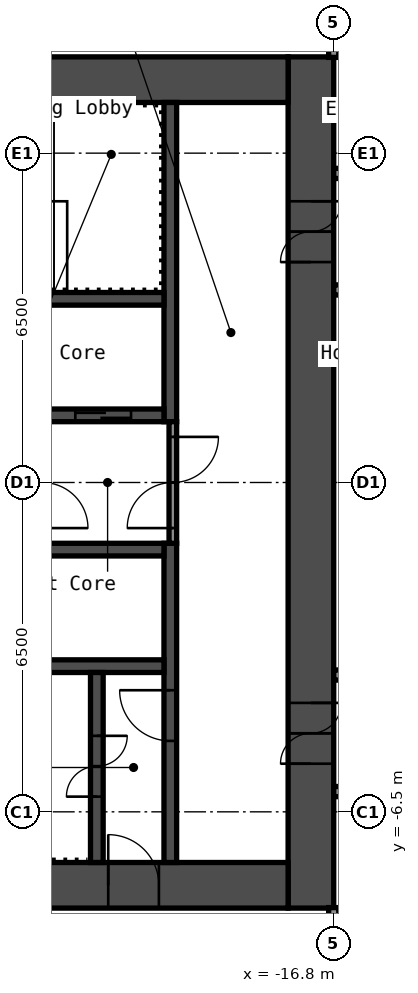
"""IFC4 building model, lengths in metres.
Left out: names, types, materials, properties, quantities, classifications, styles, units other than length and angle.
Written with IfcOpenShell. Run it as: python <this file> out.ifc"""

import sys

from ifc_helpers import new_model, si_unit, direction, frame, frame_2d, origin, place, context, subcontext, project, spatial, rectangle, extrude, element, fill, save


model = new_model("IFC4")
c1 = context("Model", 3, precision=1e-05, world=origin(), true_north=direction((0.0, 1.0)))
c2 = subcontext(c1, "Body", "Model", "MODEL_VIEW")
j1 = project(units=[si_unit("LENGTHUNIT", "METRE"), si_unit("PLANEANGLEUNIT", "RADIAN")], contexts=[c1])
p1 = place(None, origin())
s1 = spatial("IfcSite", under=j1, at=p1, CompositionType="ELEMENT")
p2 = place(p1, origin())
s2 = spatial("IfcBuilding", under=s1, at=p2, CompositionType="ELEMENT")
p3 = place(p2, frame((0.0, 0.0, 51.8)))
s3 = spatial("IfcBuildingStorey", under=s2, at=p3, CompositionType="ELEMENT", Elevation=51.8)
p4 = place(p3, frame((-17.25, -8.4, 0.0), z_axis=(0.0, 0.0, 1.0), x_axis=(0.0, 1.0, 0.0)))
e1 = element("IfcWall", 1, at=p4, inside=s3, PredefinedType="SHEAR", context=c2, shape_type="SweptSolid", body=[
    extrude(rectangle(XDim=16.8, YDim=0.9, at=frame_2d((8.4, 0.0))), origin(), (0.0, 0.0, 1.0), 2.8),
])
p5 = place(p4, frame((12.75, 0.0, 0.0)))
e2 = element("IfcOpeningElement", 2, at=p5, cuts=e1, PredefinedType="OPENING", context=c2, shape_type="SweptSolid", body=[
    extrude(rectangle(XDim=1.2, YDim=2.1, at=frame_2d((0.6, 1.05))), frame((0.0, 0.46, 0.0), z_axis=(0.0, -1.0, 0.0), x_axis=(1.0, 0.0, 0.0)), (0.0, 0.0, 1.0), 0.92),
])
p6 = place(p4, frame((2.85, 0.0, 0.0)))
e3 = element("IfcOpeningElement", 3, at=p6, cuts=e1, PredefinedType="OPENING", context=c2, shape_type="SweptSolid", body=[
    extrude(rectangle(XDim=1.2, YDim=2.1, at=frame_2d((0.6, 1.05))), frame((0.0, 0.46, 0.0), z_axis=(0.0, -1.0, 0.0), x_axis=(1.0, 0.0, 0.0)), (0.0, 0.0, 1.0), 0.92),
])
p7 = place(p3, frame((-32.7, 7.95, 0.0), z_axis=(0.0, 0.0, 1.0), x_axis=(1.0, 0.0, 0.0)))
e4 = element("IfcWall", 4, at=p7, inside=s3, PredefinedType="SHEAR", context=c2, shape_type="SweptSolid", body=[
    extrude(rectangle(XDim=15.0, YDim=0.9, at=frame_2d((7.5, 0.0))), origin(), (0.0, 0.0, 1.0), 2.8),
])
p8 = place(p7, frame((3.4, 0.0, 0.0)))
e5 = element("IfcOpeningElement", 5, at=p8, cuts=e4, PredefinedType="OPENING", context=c2, shape_type="SweptSolid", body=[
    extrude(rectangle(XDim=1.2, YDim=2.1, at=frame_2d((0.6, 1.05))), frame((0.0, 0.46, 0.0), z_axis=(0.0, -1.0, 0.0), x_axis=(1.0, 0.0, 0.0)), (0.0, 0.0, 1.0), 0.92),
])
p9 = place(p7, frame((0.75, 0.0, 0.0)))
e6 = element("IfcOpeningElement", 6, at=p9, cuts=e4, PredefinedType="OPENING", context=c2, shape_type="SweptSolid", body=[
    extrude(rectangle(XDim=0.9, YDim=2.1, at=frame_2d((0.45, 1.05))), frame((0.0, 0.46, 0.0), z_axis=(0.0, -1.0, 0.0), x_axis=(1.0, 0.0, 0.0)), (0.0, 0.0, 1.0), 0.92),
])
p10 = place(p3, frame((-32.7, -7.95, 0.0), z_axis=(0.0, 0.0, 1.0), x_axis=(1.0, 0.0, 0.0)))
e7 = element("IfcWall", 7, at=p10, inside=s3, PredefinedType="SHEAR", context=c2, shape_type="SweptSolid", body=[
    extrude(rectangle(XDim=15.0, YDim=0.9, at=frame_2d((7.5, 0.0))), origin(), (0.0, 0.0, 1.0), 2.8),
])
p11 = place(p10, frame((11.45, 0.0, 0.0)))
e8 = element("IfcOpeningElement", 8, at=p11, cuts=e7, PredefinedType="OPENING", context=c2, shape_type="SweptSolid", body=[
    extrude(rectangle(XDim=1.0, YDim=2.1, at=frame_2d((0.5, 1.05))), frame((0.0, 0.46, 0.0), z_axis=(0.0, -1.0, 0.0), x_axis=(1.0, 0.0, 0.0)), (0.0, 0.0, 1.0), 0.92),
])
p12 = place(p3, frame((-20.025, 1.2, 0.0), z_axis=(0.0, 0.0, 1.0), x_axis=(0.0, 1.0, 0.0)))
e9 = element("IfcWall", 9, at=p12, inside=s3, PredefinedType="SHEAR", context=c2, shape_type="SweptSolid", body=[
    extrude(rectangle(XDim=6.3, YDim=0.25, at=frame_2d((3.15, 0.0))), origin(), (0.0, 0.0, 1.0), 2.8),
])
p13 = place(p3, frame((-20.025, -7.5, 0.0), z_axis=(0.0, 0.0, 1.0), x_axis=(0.0, 1.0, 0.0)))
e10 = element("IfcWall", 10, at=p13, inside=s3, PredefinedType="SHEAR", context=c2, shape_type="SweptSolid", body=[
    extrude(rectangle(XDim=6.3, YDim=0.25, at=frame_2d((3.15, 0.0))), origin(), (0.0, 0.0, 1.0), 2.8),
])
p14 = place(p13, frame((2.4, 0.0, 0.0)))
e11 = element("IfcOpeningElement", 11, at=p14, cuts=e10, PredefinedType="OPENING", context=c2, shape_type="SweptSolid", body=[
    extrude(rectangle(XDim=1.0, YDim=2.1, at=frame_2d((0.5, 1.05))), frame((0.0, 0.135, 0.0), z_axis=(0.0, -1.0, 0.0), x_axis=(1.0, 0.0, 0.0)), (0.0, 0.0, 1.0), 0.27),
])
p15 = place(p3, frame((-27.65, 1.325, 0.0), z_axis=(0.0, 0.0, 1.0), x_axis=(1.0, 0.0, 0.0)))
e12 = element("IfcWall", 12, at=p15, inside=s3, PredefinedType="SHEAR", context=c2, shape_type="SweptSolid", body=[
    extrude(rectangle(XDim=7.5, YDim=0.25, at=frame_2d((3.75, 0.0))), origin(), (0.0, 0.0, 1.0), 2.8),
])
p16 = place(p15, frame((5.75, 0.0, 0.0)))
e13 = element("IfcOpeningElement", 13, at=p16, cuts=e12, PredefinedType="OPENING", context=c2, shape_type="SweptSolid", body=[
    extrude(rectangle(XDim=1.1, YDim=2.1, at=frame_2d((0.55, 1.05))), frame((0.0, 0.135, 0.0), z_axis=(0.0, -1.0, 0.0), x_axis=(1.0, 0.0, 0.0)), (0.0, 0.0, 1.0), 0.27),
])
p17 = place(p15, frame((3.35, 0.0, 0.0)))
e14 = element("IfcOpeningElement", 14, at=p17, cuts=e12, PredefinedType="OPENING", context=c2, shape_type="SweptSolid", body=[
    extrude(rectangle(XDim=1.1, YDim=2.1, at=frame_2d((0.55, 1.05))), frame((0.0, 0.135, 0.0), z_axis=(0.0, -1.0, 0.0), x_axis=(1.0, 0.0, 0.0)), (0.0, 0.0, 1.0), 0.27),
])
p18 = place(p15, frame((0.95, 0.0, 0.0)))
e15 = element("IfcOpeningElement", 15, at=p18, cuts=e12, PredefinedType="OPENING", context=c2, shape_type="SweptSolid", body=[
    extrude(rectangle(XDim=1.1, YDim=2.1, at=frame_2d((0.55, 1.05))), frame((0.0, 0.135, 0.0), z_axis=(0.0, -1.0, 0.0), x_axis=(1.0, 0.0, 0.0)), (0.0, 0.0, 1.0), 0.27),
])
for number, where, z_axis, x_axis in (
    (16, (-27.65, 3.625, 0.0), (0.0, 0.0, 1.0), (1.0, 0.0, 0.0)),
    (17, (-27.65, -1.325, 0.0), (0.0, 0.0, 1.0), (1.0, 0.0, 0.0)),
    (18, (-27.65, -3.625, 0.0), (0.0, 0.0, 1.0), (1.0, 0.0, 0.0)),
):
    element("IfcWall", number, at=place(p3, frame(where, z_axis=z_axis, x_axis=x_axis)), inside=s3, PredefinedType="SHEAR", context=c2, shape_type="SweptSolid", body=[
        extrude(rectangle(XDim=7.5, YDim=0.25, at=frame_2d((3.75, 0.0))), origin(), (0.0, 0.0, 1.0), 2.8),
    ])
p19 = place(p3, frame((-21.475, -7.5, 0.0), z_axis=(0.0, 0.0, 1.0), x_axis=(0.0, 1.0, 0.0)))
e19 = element("IfcWall", 19, at=p19, inside=s3, PredefinedType="SHEAR", context=c2, shape_type="SweptSolid", body=[
    extrude(rectangle(XDim=3.75, YDim=0.25, at=frame_2d((1.875, 0.0))), origin(), (0.0, 0.0, 1.0), 2.8),
])
p20 = place(p19, frame((1.3, 0.0, 0.0)))
e20 = element("IfcOpeningElement", 20, at=p20, cuts=e19, PredefinedType="OPENING", context=c2, shape_type="SweptSolid", body=[
    extrude(rectangle(XDim=1.2, YDim=2.1, at=frame_2d((0.6, 1.05))), frame((0.0, 0.135, 0.0), z_axis=(0.0, -1.0, 0.0), x_axis=(1.0, 0.0, 0.0)), (0.0, 0.0, 1.0), 0.27),
])
p21 = place(p3, frame((-19.975, -1.2, 0.0), z_axis=(0.0, 0.0, 1.0), x_axis=(0.0, 1.0, 0.0)))
e21 = element("IfcWall", 21, at=p21, inside=s3, PredefinedType="PARTITIONING", context=c2, shape_type="SweptSolid", body=[
    extrude(rectangle(XDim=2.4, YDim=0.15, at=frame_2d((1.2, 0.0))), origin(), (0.0, 0.0, 1.0), 2.8),
])
p22 = place(p21, frame((0.3, 0.0, 0.0)))
e22 = element("IfcOpeningElement", 22, at=p22, cuts=e21, PredefinedType="OPENING", context=c2, shape_type="SweptSolid", body=[
    extrude(rectangle(XDim=1.8, YDim=2.1, at=frame_2d((0.9, 1.05))), frame((0.0, 0.085, 0.0), z_axis=(0.0, -1.0, 0.0), x_axis=(1.0, 0.0, 0.0)), (0.0, 0.0, 1.0), 0.17),
])
p23 = place(p3, frame((-16.8, -6.1, 0.0), z_axis=(0.0, 0.0, 1.0), x_axis=(1.0, 0.0, 0.0)))
e23 = element("IfcWall", 23, at=p23, inside=s3, PredefinedType="PARTITIONING", context=c2, shape_type="SweptSolid", body=[
    extrude(rectangle(XDim=33.6, YDim=0.2, at=frame_2d((16.8, 0.0))), origin(), (0.0, 0.0, 1.0), 2.8),
])
p24 = place(p23, frame((2.0, 0.0, 0.0)))
e24 = element("IfcOpeningElement", 24, at=p24, cuts=e23, PredefinedType="OPENING", context=c2, shape_type="SweptSolid", body=[
    extrude(rectangle(XDim=1.0, YDim=2.1, at=frame_2d((0.5, 1.05))), frame((0.0, 0.11, 0.0), z_axis=(0.0, -1.0, 0.0), x_axis=(1.0, 0.0, 0.0)), (0.0, 0.0, 1.0), 0.22),
])
p25 = place(p23, frame((9.46, 0.0, 0.0)))
e25 = element("IfcOpeningElement", 25, at=p25, cuts=e23, PredefinedType="OPENING", context=c2, shape_type="SweptSolid", body=[
    extrude(rectangle(XDim=0.9, YDim=2.1, at=frame_2d((0.45, 1.05))), frame((0.0, 0.11, 0.0), z_axis=(0.0, -1.0, 0.0), x_axis=(1.0, 0.0, 0.0)), (0.0, 0.0, 1.0), 0.22),
])
p26 = place(p23, frame((13.66, 0.0, 0.0)))
e26 = element("IfcOpeningElement", 26, at=p26, cuts=e23, PredefinedType="OPENING", context=c2, shape_type="SweptSolid", body=[
    extrude(rectangle(XDim=0.9, YDim=2.1, at=frame_2d((0.45, 1.05))), frame((0.0, 0.11, 0.0), z_axis=(0.0, -1.0, 0.0), x_axis=(1.0, 0.0, 0.0)), (0.0, 0.0, 1.0), 0.22),
])
p27 = place(p23, frame((18.8, 0.0, 0.0)))
e27 = element("IfcOpeningElement", 27, at=p27, cuts=e23, PredefinedType="OPENING", context=c2, shape_type="SweptSolid", body=[
    extrude(rectangle(XDim=1.0, YDim=2.1, at=frame_2d((0.5, 1.05))), frame((0.0, 0.11, 0.0), z_axis=(0.0, -1.0, 0.0), x_axis=(1.0, 0.0, 0.0)), (0.0, 0.0, 1.0), 0.22),
])
p28 = place(p23, frame((27.2, 0.0, 0.0)))
e28 = element("IfcOpeningElement", 28, at=p28, cuts=e23, PredefinedType="OPENING", context=c2, shape_type="SweptSolid", body=[
    extrude(rectangle(XDim=1.0, YDim=2.1, at=frame_2d((0.5, 1.05))), frame((0.0, 0.11, 0.0), z_axis=(0.0, -1.0, 0.0), x_axis=(1.0, 0.0, 0.0)), (0.0, 0.0, 1.0), 0.22),
])
p29 = place(p3, frame((-16.8, -3.8, 0.0), z_axis=(0.0, 0.0, 1.0), x_axis=(1.0, 0.0, 0.0)))
e29 = element("IfcWall", 29, at=p29, inside=s3, PredefinedType="PARTITIONING", context=c2, shape_type="SweptSolid", body=[
    extrude(rectangle(XDim=33.6, YDim=0.2, at=frame_2d((16.8, 0.0))), origin(), (0.0, 0.0, 1.0), 2.8),
])
p30 = place(p29, frame((9.88, 0.0, 0.0)))
e30 = element("IfcOpeningElement", 30, at=p30, cuts=e29, PredefinedType="OPENING", context=c2, shape_type="SweptSolid", body=[
    extrude(rectangle(XDim=0.9, YDim=2.1, at=frame_2d((0.45, 1.05))), frame((0.0, 0.11, 0.0), z_axis=(0.0, -1.0, 0.0), x_axis=(1.0, 0.0, 0.0)), (0.0, 0.0, 1.0), 0.22),
])
p31 = place(p29, frame((14.08, 0.0, 0.0)))
e31 = element("IfcOpeningElement", 31, at=p31, cuts=e29, PredefinedType="OPENING", context=c2, shape_type="SweptSolid", body=[
    extrude(rectangle(XDim=0.9, YDim=2.1, at=frame_2d((0.45, 1.05))), frame((0.0, 0.11, 0.0), z_axis=(0.0, -1.0, 0.0), x_axis=(1.0, 0.0, 0.0)), (0.0, 0.0, 1.0), 0.22),
])
p32 = place(p29, frame((27.355, 0.0, 0.0)))
e32 = element("IfcOpeningElement", 32, at=p32, cuts=e29, PredefinedType="OPENING", context=c2, shape_type="SweptSolid", body=[
    extrude(rectangle(XDim=0.9, YDim=2.1, at=frame_2d((0.45, 1.05))), frame((0.0, 0.11, 0.0), z_axis=(0.0, -1.0, 0.0), x_axis=(1.0, 0.0, 0.0)), (0.0, 0.0, 1.0), 0.22),
])
p33 = place(p29, frame((31.555, 0.0, 0.0)))
e33 = element("IfcOpeningElement", 33, at=p33, cuts=e29, PredefinedType="OPENING", context=c2, shape_type="SweptSolid", body=[
    extrude(rectangle(XDim=0.9, YDim=2.1, at=frame_2d((0.45, 1.05))), frame((0.0, 0.11, 0.0), z_axis=(0.0, -1.0, 0.0), x_axis=(1.0, 0.0, 0.0)), (0.0, 0.0, 1.0), 0.22),
])
p34 = place(p3, frame((-16.8, 3.8, 0.0), z_axis=(0.0, 0.0, 1.0), x_axis=(1.0, 0.0, 0.0)))
e34 = element("IfcWall", 34, at=p34, inside=s3, PredefinedType="PARTITIONING", context=c2, shape_type="SweptSolid", body=[
    extrude(rectangle(XDim=33.6, YDim=0.2, at=frame_2d((16.8, 0.0))), origin(), (0.0, 0.0, 1.0), 2.8),
])
p35 = place(p34, frame((2.24, 0.0, 0.0)))
e35 = element("IfcOpeningElement", 35, at=p35, cuts=e34, PredefinedType="OPENING", context=c2, shape_type="SweptSolid", body=[
    extrude(rectangle(XDim=0.9, YDim=2.1, at=frame_2d((0.45, 1.05))), frame((0.0, 0.11, 0.0), z_axis=(0.0, -1.0, 0.0), x_axis=(1.0, 0.0, 0.0)), (0.0, 0.0, 1.0), 0.22),
])
p36 = place(p34, frame((6.44, 0.0, 0.0)))
e36 = element("IfcOpeningElement", 36, at=p36, cuts=e34, PredefinedType="OPENING", context=c2, shape_type="SweptSolid", body=[
    extrude(rectangle(XDim=0.9, YDim=2.1, at=frame_2d((0.45, 1.05))), frame((0.0, 0.11, 0.0), z_axis=(0.0, -1.0, 0.0), x_axis=(1.0, 0.0, 0.0)), (0.0, 0.0, 1.0), 0.22),
])
p37 = place(p34, frame((18.03, 0.0, 0.0)))
e37 = element("IfcOpeningElement", 37, at=p37, cuts=e34, PredefinedType="OPENING", context=c2, shape_type="SweptSolid", body=[
    extrude(rectangle(XDim=0.9, YDim=2.1, at=frame_2d((0.45, 1.05))), frame((0.0, 0.11, 0.0), z_axis=(0.0, -1.0, 0.0), x_axis=(1.0, 0.0, 0.0)), (0.0, 0.0, 1.0), 0.22),
])
p38 = place(p34, frame((22.23, 0.0, 0.0)))
e38 = element("IfcOpeningElement", 38, at=p38, cuts=e34, PredefinedType="OPENING", context=c2, shape_type="SweptSolid", body=[
    extrude(rectangle(XDim=0.9, YDim=2.1, at=frame_2d((0.45, 1.05))), frame((0.0, 0.11, 0.0), z_axis=(0.0, -1.0, 0.0), x_axis=(1.0, 0.0, 0.0)), (0.0, 0.0, 1.0), 0.22),
])
p39 = place(p3, frame((-16.8, 6.1, 0.0), z_axis=(0.0, 0.0, 1.0), x_axis=(1.0, 0.0, 0.0)))
e39 = element("IfcWall", 39, at=p39, inside=s3, PredefinedType="PARTITIONING", context=c2, shape_type="SweptSolid", body=[
    extrude(rectangle(XDim=33.6, YDim=0.2, at=frame_2d((16.8, 0.0))), origin(), (0.0, 0.0, 1.0), 2.8),
])
p40 = place(p39, frame((5.4, 0.0, 0.0)))
e40 = element("IfcOpeningElement", 40, at=p40, cuts=e39, PredefinedType="OPENING", context=c2, shape_type="SweptSolid", body=[
    extrude(rectangle(XDim=1.0, YDim=2.1, at=frame_2d((0.5, 1.05))), frame((0.0, 0.11, 0.0), z_axis=(0.0, -1.0, 0.0), x_axis=(1.0, 0.0, 0.0)), (0.0, 0.0, 1.0), 0.22),
])
p41 = place(p39, frame((10.3, 0.0, 0.0)))
e41 = element("IfcOpeningElement", 41, at=p41, cuts=e39, PredefinedType="OPENING", context=c2, shape_type="SweptSolid", body=[
    extrude(rectangle(XDim=0.9, YDim=2.1, at=frame_2d((0.45, 1.05))), frame((0.0, 0.11, 0.0), z_axis=(0.0, -1.0, 0.0), x_axis=(1.0, 0.0, 0.0)), (0.0, 0.0, 1.0), 0.22),
])
p42 = place(p39, frame((14.5, 0.0, 0.0)))
e42 = element("IfcOpeningElement", 42, at=p42, cuts=e39, PredefinedType="OPENING", context=c2, shape_type="SweptSolid", body=[
    extrude(rectangle(XDim=0.9, YDim=2.1, at=frame_2d((0.45, 1.05))), frame((0.0, 0.11, 0.0), z_axis=(0.0, -1.0, 0.0), x_axis=(1.0, 0.0, 0.0)), (0.0, 0.0, 1.0), 0.22),
])
p43 = place(p39, frame((18.62, 0.0, 0.0)))
e43 = element("IfcOpeningElement", 43, at=p43, cuts=e39, PredefinedType="OPENING", context=c2, shape_type="SweptSolid", body=[
    extrude(rectangle(XDim=0.9, YDim=2.1, at=frame_2d((0.45, 1.05))), frame((0.0, 0.11, 0.0), z_axis=(0.0, -1.0, 0.0), x_axis=(1.0, 0.0, 0.0)), (0.0, 0.0, 1.0), 0.22),
])
p44 = place(p39, frame((22.82, 0.0, 0.0)))
e44 = element("IfcOpeningElement", 44, at=p44, cuts=e39, PredefinedType="OPENING", context=c2, shape_type="SweptSolid", body=[
    extrude(rectangle(XDim=0.9, YDim=2.1, at=frame_2d((0.45, 1.05))), frame((0.0, 0.11, 0.0), z_axis=(0.0, -1.0, 0.0), x_axis=(1.0, 0.0, 0.0)), (0.0, 0.0, 1.0), 0.22),
])
p45 = place(p39, frame((27.2, 0.0, 0.0)))
e45 = element("IfcOpeningElement", 45, at=p45, cuts=e39, PredefinedType="OPENING", context=c2, shape_type="SweptSolid", body=[
    extrude(rectangle(XDim=1.0, YDim=2.1, at=frame_2d((0.5, 1.05))), frame((0.0, 0.11, 0.0), z_axis=(0.0, -1.0, 0.0), x_axis=(1.0, 0.0, 0.0)), (0.0, 0.0, 1.0), 0.22),
])
for number, where, z_axis, x_axis in (
    (46, (-16.8, -20.3, 0.0), (0.0, 0.0, 1.0), (0.0, 1.0, 0.0)),
    (47, (-16.8, 8.39, 0.0), (0.0, 0.0, 1.0), (0.0, 1.0, 0.0)),
):
    element("IfcWall", number, at=place(p3, frame(where, z_axis=z_axis, x_axis=x_axis)), inside=s3, PredefinedType="PARTITIONING", context=c2, shape_type="SweptSolid", body=[
        extrude(rectangle(XDim=11.91, YDim=0.2, at=frame_2d((5.955, 0.0))), origin(), (0.0, 0.0, 1.0), 2.8),
    ])
p46 = place(p5, origin())
e48 = element("IfcDoor", 48, at=p46, inside=s3, OperationType="DOUBLE_DOOR_SINGLE_SWING", PredefinedType="DOOR", context=c2, shape_type="SweptSolid", body=[
    extrude(rectangle(XDim=1.2, YDim=2.1, at=frame_2d((0.6, 1.05))), frame((0.0, 0.025, 0.0), z_axis=(0.0, -1.0, 0.0), x_axis=(1.0, 0.0, 0.0)), (0.0, 0.0, 1.0), 0.05),
])
fill(e2, e48)
p47 = place(p6, origin())
e49 = element("IfcDoor", 49, at=p47, inside=s3, OperationType="DOUBLE_DOOR_SINGLE_SWING", PredefinedType="DOOR", context=c2, shape_type="SweptSolid", body=[
    extrude(rectangle(XDim=1.2, YDim=2.1, at=frame_2d((0.6, 1.05))), frame((0.0, 0.025, 0.0), z_axis=(0.0, -1.0, 0.0), x_axis=(1.0, 0.0, 0.0)), (0.0, 0.0, 1.0), 0.05),
])
fill(e3, e49)
p48 = place(p11, origin())
e50 = element("IfcDoor", 50, at=p48, inside=s3, OperationType="SINGLE_SWING_RIGHT", PredefinedType="DOOR", context=c2, shape_type="SweptSolid", body=[
    extrude(rectangle(XDim=1.0, YDim=2.1, at=frame_2d((0.5, 1.05))), frame((0.0, 0.025, 0.0), z_axis=(0.0, -1.0, 0.0), x_axis=(1.0, 0.0, 0.0)), (0.0, 0.0, 1.0), 0.05),
])
fill(e8, e50)
p49 = place(p20, origin())
e51 = element("IfcDoor", 51, at=p49, inside=s3, OperationType="DOUBLE_DOOR_SINGLE_SWING", PredefinedType="DOOR", context=c2, shape_type="SweptSolid", body=[
    extrude(rectangle(XDim=1.2, YDim=2.1, at=frame_2d((0.6, 1.05))), frame((0.0, 0.025, 0.0), z_axis=(0.0, -1.0, 0.0), x_axis=(1.0, 0.0, 0.0)), (0.0, 0.0, 1.0), 0.05),
])
fill(e20, e51)
p50 = place(p14, origin())
e52 = element("IfcDoor", 52, at=p50, inside=s3, OperationType="SINGLE_SWING_LEFT", PredefinedType="DOOR", context=c2, shape_type="SweptSolid", body=[
    extrude(rectangle(XDim=1.0, YDim=2.1, at=frame_2d((0.5, 1.05))), frame((0.0, 0.025, 0.0), z_axis=(0.0, -1.0, 0.0), x_axis=(1.0, 0.0, 0.0)), (0.0, 0.0, 1.0), 0.05),
])
fill(e11, e52)
p51 = place(p22, origin())
e53 = element("IfcDoor", 53, at=p51, inside=s3, OperationType="DOUBLE_DOOR_SINGLE_SWING", PredefinedType="DOOR", context=c2, shape_type="SweptSolid", body=[
    extrude(rectangle(XDim=1.8, YDim=2.1, at=frame_2d((0.9, 1.05))), frame((0.0, 0.025, 0.0), z_axis=(0.0, -1.0, 0.0), x_axis=(1.0, 0.0, 0.0)), (0.0, 0.0, 1.0), 0.05),
])
fill(e22, e53)
p52 = place(p16, origin())
e54 = element("IfcDoor", 54, at=p52, inside=s3, OperationType="DOUBLE_DOOR_SLIDING", PredefinedType="DOOR", context=c2, shape_type="SweptSolid", body=[
    extrude(rectangle(XDim=1.1, YDim=2.1, at=frame_2d((0.55, 1.05))), frame((0.0, 0.025, 0.0), z_axis=(0.0, -1.0, 0.0), x_axis=(1.0, 0.0, 0.0)), (0.0, 0.0, 1.0), 0.05),
])
fill(e13, e54)
save(model, sys.argv[1])
